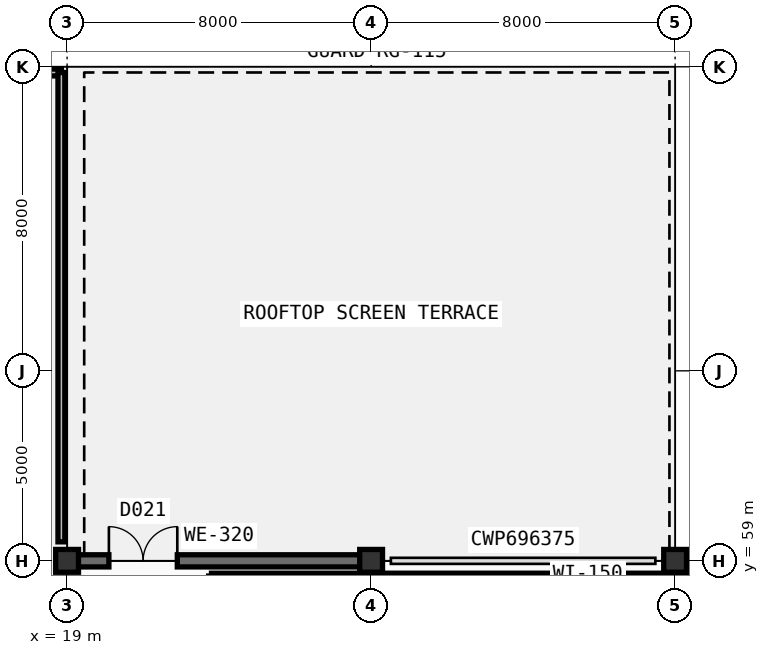
"""IFC4 building model, lengths in metres.
Left out: names, types, materials, properties, quantities, classifications, styles, units other than length and angle.
Written with IfcOpenShell. Run it as: python <this file> out.ifc"""

import sys

from ifc_helpers import new_model, si_unit, direction, frame, frame_2d, origin, origin_2d, place, context, subcontext, project, spatial, rectangle, extrude, element, fill, save


model = new_model("IFC4")
c1 = context("Model", 3, precision=1e-05, world=origin(), true_north=direction((0.0, 1.0)))
c2 = subcontext(c1, "Body", "Model", "MODEL_VIEW")
j1 = project(units=[si_unit("LENGTHUNIT", "METRE"), si_unit("PLANEANGLEUNIT", "RADIAN")], contexts=[c1])
p1 = place(None, origin())
s1 = spatial("IfcSite", under=j1, at=p1, CompositionType="ELEMENT")
p2 = place(p1, origin())
s2 = spatial("IfcBuilding", under=s1, at=p2, CompositionType="ELEMENT")
p3 = place(p2, frame((0.0, 0.0, 23.4)))
s3 = spatial("IfcBuildingStorey", under=s2, at=p3, CompositionType="ELEMENT", Elevation=23.4)
for number, where, z_axis, x_axis in (
    (1, (19.0, 59.0, 0.0), (0.0, 0.0, 1.0), (1.0, 0.0, 0.0)),
    (2, (27.0, 59.0, 0.0), (0.0, 0.0, 1.0), (1.0, 0.0, 0.0)),
    (3, (35.0, 59.0, 0.0), (0.0, 0.0, 1.0), (1.0, 0.0, 0.0)),
):
    element("IfcColumn", number, at=place(p3, frame(where, z_axis=z_axis, x_axis=x_axis)), inside=s3, PredefinedType="COLUMN", context=c2, shape_type="SweptSolid", body=[
        extrude(rectangle(XDim=0.6, YDim=0.6, at=origin_2d()), origin(), (0.0, 0.0, 1.0), 4.5),
    ])
p4 = place(p3, frame((19.0, 59.0, 0.0), z_axis=(0.0, 0.0, 1.0), x_axis=(1.0, 0.0, 0.0)))
e4 = element("IfcWall", 4, at=p4, inside=s3, PredefinedType="SOLIDWALL", context=c2, shape_type="SweptSolid", body=[
    extrude(rectangle(XDim=8.0, YDim=0.32, at=frame_2d((4.0, 0.0))), origin(), (0.0, 0.0, 1.0), 4.5),
])
p5 = place(p4, frame((1.1, 0.0, 0.0)))
e5 = element("IfcOpeningElement", 5, at=p5, cuts=e4, PredefinedType="OPENING", context=c2, shape_type="SweptSolid", body=[
    extrude(rectangle(XDim=1.8, YDim=2.3, at=frame_2d((0.9, 1.15))), frame((0.0, 0.17, 0.0), z_axis=(0.0, -1.0, 0.0), x_axis=(1.0, 0.0, 0.0)), (0.0, 0.0, 1.0), 0.34),
])
p6 = place(p3, frame((3.15, 71.85, 0.0), z_axis=(0.0, 0.0, 1.0), x_axis=(1.0, 0.0, 0.0)))
e6 = element("IfcWall", 6, at=p6, inside=s3, PredefinedType="PARAPET", context=c2, shape_type="SweptSolid", body=[
    extrude(rectangle(XDim=15.7, YDim=0.18, at=frame_2d((7.85, 0.0))), origin(), (0.0, 0.0, 1.0), 1.15),
])
p7 = place(p3, frame((18.85, 59.5, 0.0), z_axis=(0.0, 0.0, 1.0), x_axis=(0.0, 1.0, 0.0)))
e7 = element("IfcWall", 7, at=p7, inside=s3, PredefinedType="PARAPET", context=c2, shape_type="SweptSolid", body=[
    extrude(rectangle(XDim=12.35, YDim=0.18, at=frame_2d((6.175, 0.0))), origin(), (0.0, 0.0, 1.0), 1.15),
])
p8 = place(p3, frame((22.8, 58.6, 0.0), z_axis=(0.0, 0.0, 1.0), x_axis=(1.0, 0.0, 0.0)))
e8 = element("IfcWall", 8, at=p8, inside=s3, PredefinedType="PARTITIONING", context=c2, shape_type="SweptSolid", body=[
    extrude(rectangle(XDim=19.8, YDim=0.15, at=frame_2d((9.9, 0.0))), origin(), (0.0, 0.0, 1.0), 3.505),
])
p9 = place(p5, origin())
e9 = element("IfcDoor", 9, at=p9, inside=s3, OperationType="DOUBLE_DOOR_SINGLE_SWING", PredefinedType="DOOR", context=c2, shape_type="SweptSolid", body=[
    extrude(rectangle(XDim=1.8, YDim=2.3, at=frame_2d((0.9, 1.15))), frame((0.0, 0.025, 0.0), z_axis=(0.0, -1.0, 0.0), x_axis=(1.0, 0.0, 0.0)), (0.0, 0.0, 1.0), 0.05),
])
fill(e5, e9)
save(model, sys.argv[1])
